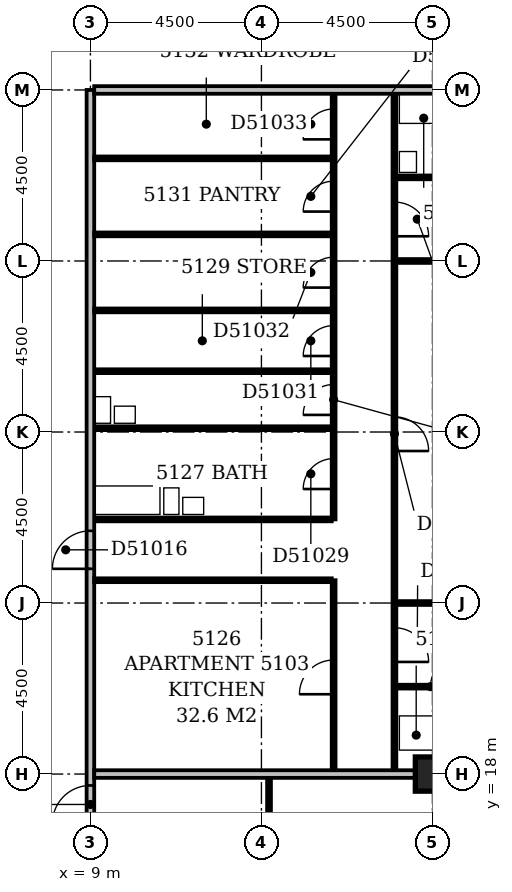
"""IFC4 building model, lengths in metres.
Left out: names, types, materials, properties, quantities, classifications, styles, units other than length and angle.
Written with IfcOpenShell. Run it as: python <this file> out.ifc"""

import sys

from ifc_helpers import new_model, si_unit, direction, frame, frame_2d, origin, origin_2d, place, context, subcontext, project, spatial, rectangle, extrude, element, fill, save


model = new_model("IFC4")
c1 = context("Model", 3, precision=1e-05, world=origin(), true_north=direction((0.0, 1.0)))
c2 = subcontext(c1, "Body", "Model", "MODEL_VIEW")
j1 = project(units=[si_unit("LENGTHUNIT", "METRE"), si_unit("PLANEANGLEUNIT", "RADIAN")], contexts=[c1])
p1 = place(None, origin())
s1 = spatial("IfcSite", under=j1, at=p1, CompositionType="ELEMENT")
p2 = place(p1, origin())
s2 = spatial("IfcBuilding", under=s1, at=p2, CompositionType="ELEMENT")
p3 = place(p2, frame((0.0, 0.0, 200.6)))
s3 = spatial("IfcBuildingStorey", under=s2, at=p3, CompositionType="ELEMENT", Elevation=200.6)
p4 = place(p3, frame((18.0, 18.0, -0.3), z_axis=(0.0, 0.0, 1.0), x_axis=(1.0, 0.0, 0.0)))
e1 = element("IfcColumn", 1, at=p4, inside=s3, PredefinedType="COLUMN", context=c2, shape_type="SweptSolid", body=[
    extrude(rectangle(XDim=0.9, YDim=0.9, at=origin_2d()), origin(), (0.0, 0.0, 1.0), 3.6),
])
p5 = place(p3, frame((9.0, 5.0, 0.0), z_axis=(0.0, 0.0, 1.0), x_axis=(0.0, 1.0, 0.0)))
e2 = element("IfcWall", 2, at=p5, inside=s3, PredefinedType="PARTITIONING", context=c2, shape_type="SweptSolid", body=[
    extrude(rectangle(XDim=31.0, YDim=0.2, at=frame_2d((15.5, 0.0))), origin(), (0.0, 0.0, 1.0), 3.3),
])
p6 = place(p5, frame((18.4, 0.0, 0.0)))
e3 = element("IfcOpeningElement", 3, at=p6, cuts=e2, PredefinedType="OPENING", context=c2, shape_type="SweptSolid", body=[
    extrude(rectangle(XDim=1.0, YDim=2.1, at=frame_2d((0.5, 1.05))), frame((0.0, 0.112, 0.0), z_axis=(0.0, -1.0, 0.0), x_axis=(1.0, 0.0, 0.0)), (0.0, 0.0, 1.0), 0.224),
])
p7 = place(p5, frame((11.7, 0.0, 0.0)))
e4 = element("IfcOpeningElement", 4, at=p7, cuts=e2, PredefinedType="OPENING", context=c2, shape_type="SweptSolid", body=[
    extrude(rectangle(XDim=1.0, YDim=2.1, at=frame_2d((0.5, 1.05))), frame((0.0, 0.112, 0.0), z_axis=(0.0, -1.0, 0.0), x_axis=(1.0, 0.0, 0.0)), (0.0, 0.0, 1.0), 0.224),
])
p8 = place(p5, frame((1.5, 0.0, 0.0)))
e5 = element("IfcOpeningElement", 5, at=p8, cuts=e2, PredefinedType="OPENING", context=c2, shape_type="SweptSolid", body=[
    extrude(rectangle(XDim=0.9, YDim=2.1, at=frame_2d((0.45, 1.05))), frame((0.0, 0.112, 0.0), z_axis=(0.0, -1.0, 0.0), x_axis=(1.0, 0.0, 0.0)), (0.0, 0.0, 1.0), 0.224),
])
p9 = place(p3, frame((13.7, 9.45, 0.0), z_axis=(0.0, 0.0, 1.0), x_axis=(0.0, 1.0, 0.0)))
e6 = element("IfcWall", 6, at=p9, inside=s3, PredefinedType="PARTITIONING", context=c2, shape_type="SweptSolid", body=[
    extrude(rectangle(XDim=8.45, YDim=0.1, at=frame_2d((4.225, 0.0))), origin(), (0.0, 0.0, 1.0), 3.3),
])
p10 = place(p9, frame((1.35, 0.0, 0.0)))
e7 = element("IfcOpeningElement", 7, at=p10, cuts=e6, PredefinedType="OPENING", context=c2, shape_type="SweptSolid", body=[
    extrude(rectangle(XDim=0.9, YDim=2.1, at=frame_2d((0.45, 1.05))), frame((0.0, 0.062, 0.0), z_axis=(0.0, -1.0, 0.0), x_axis=(1.0, 0.0, 0.0)), (0.0, 0.0, 1.0), 0.124),
])
p11 = place(p9, frame((5.85, 0.0, 0.0)))
e8 = element("IfcOpeningElement", 8, at=p11, cuts=e6, PredefinedType="OPENING", context=c2, shape_type="SweptSolid", body=[
    extrude(rectangle(XDim=0.9, YDim=2.1, at=frame_2d((0.45, 1.05))), frame((0.0, 0.062, 0.0), z_axis=(0.0, -1.0, 0.0), x_axis=(1.0, 0.0, 0.0)), (0.0, 0.0, 1.0), 0.124),
])
p12 = place(p3, frame((9.1, 18.0, 0.0), z_axis=(0.0, 0.0, 1.0), x_axis=(1.0, 0.0, 0.0)))
e9 = element("IfcWall", 9, at=p12, inside=s3, PredefinedType="PARTITIONING", context=c2, shape_type="SweptSolid", body=[
    extrude(rectangle(XDim=8.45, YDim=0.2, at=frame_2d((4.225, 0.0))), origin(), (0.0, 0.0, 1.0), 2.6),
])
p13 = place(p3, frame((15.4, 18.1, 0.0), z_axis=(0.0, 0.0, 1.0), x_axis=(0.0, 1.0, 0.0)))
e10 = element("IfcWall", 10, at=p13, inside=s3, PredefinedType="PARTITIONING", context=c2, shape_type="SweptSolid", body=[
    extrude(rectangle(XDim=5.0, YDim=0.1, at=frame_2d((2.5, 0.0))), origin(), (0.0, 0.0, 1.0), 3.3),
])
p14 = place(p13, frame((2.0, 0.0, 0.0)))
e11 = element("IfcOpeningElement", 11, at=p14, cuts=e10, PredefinedType="OPENING", context=c2, shape_type="SweptSolid", body=[
    extrude(rectangle(XDim=0.9, YDim=2.1, at=frame_2d((0.45, 1.05))), frame((0.0, 0.062, 0.0), z_axis=(0.0, -1.0, 0.0), x_axis=(1.0, 0.0, 0.0)), (0.0, 0.0, 1.0), 0.124),
])
p15 = place(p3, frame((17.0, 18.1, 0.0), z_axis=(0.0, 0.0, 1.0), x_axis=(0.0, 1.0, 0.0)))
e12 = element("IfcWall", 12, at=p15, inside=s3, PredefinedType="PARTITIONING", context=c2, shape_type="SweptSolid", body=[
    extrude(rectangle(XDim=17.8, YDim=0.1, at=frame_2d((8.9, 0.0))), origin(), (0.0, 0.0, 1.0), 3.3),
])
p16 = place(p15, frame((2.85, 0.0, 0.0)))
e13 = element("IfcOpeningElement", 13, at=p16, cuts=e12, PredefinedType="OPENING", context=c2, shape_type="SweptSolid", body=[
    extrude(rectangle(XDim=0.9, YDim=2.1, at=frame_2d((0.45, 1.05))), frame((0.0, 0.062, 0.0), z_axis=(0.0, -1.0, 0.0), x_axis=(1.0, 0.0, 0.0)), (0.0, 0.0, 1.0), 0.124),
])
p17 = place(p15, frame((8.4, 0.0, 0.0)))
e14 = element("IfcOpeningElement", 14, at=p17, cuts=e12, PredefinedType="OPENING", context=c2, shape_type="SweptSolid", body=[
    extrude(rectangle(XDim=0.9, YDim=2.1, at=frame_2d((0.45, 1.05))), frame((0.0, 0.062, 0.0), z_axis=(0.0, -1.0, 0.0), x_axis=(1.0, 0.0, 0.0)), (0.0, 0.0, 1.0), 0.124),
])
p18 = place(p15, frame((14.05, 0.0, 0.0)))
e15 = element("IfcOpeningElement", 15, at=p18, cuts=e12, PredefinedType="OPENING", context=c2, shape_type="SweptSolid", body=[
    extrude(rectangle(XDim=0.9, YDim=2.1, at=frame_2d((0.45, 1.05))), frame((0.0, 0.062, 0.0), z_axis=(0.0, -1.0, 0.0), x_axis=(1.0, 0.0, 0.0)), (0.0, 0.0, 1.0), 0.124),
])
p19 = place(p3, frame((17.05, 20.3, 0.0), z_axis=(0.0, 0.0, 1.0), x_axis=(1.0, 0.0, 0.0)))
e16 = element("IfcWall", 16, at=p19, inside=s3, PredefinedType="PLUMBINGWALL", context=c2, shape_type="SweptSolid", body=[
    extrude(rectangle(XDim=1.8, YDim=0.1, at=frame_2d((0.9, 0.0))), origin(), (0.0, 0.0, 1.0), 3.3),
])
p20 = place(p19, frame((0.9, 0.0, 0.0)))
e17 = element("IfcOpeningElement", 17, at=p20, cuts=e16, PredefinedType="OPENING", context=c2, shape_type="SweptSolid", body=[
    extrude(rectangle(XDim=0.8, YDim=2.1, at=frame_2d((0.4, 1.05))), frame((0.0, 0.062, 0.0), z_axis=(0.0, -1.0, 0.0), x_axis=(1.0, 0.0, 0.0)), (0.0, 0.0, 1.0), 0.124),
])
p21 = place(p3, frame((17.05, 22.5, 0.0), z_axis=(0.0, 0.0, 1.0), x_axis=(1.0, 0.0, 0.0)))
e18 = element("IfcWall", 18, at=p21, inside=s3, PredefinedType="PARTITIONING", context=c2, shape_type="SweptSolid", body=[
    extrude(rectangle(XDim=5.0, YDim=0.1, at=frame_2d((2.5, 0.0))), origin(), (0.0, 0.0, 1.0), 3.3),
])
p22 = place(p3, frame((9.1, 23.1, 0.0), z_axis=(0.0, 0.0, 1.0), x_axis=(1.0, 0.0, 0.0)))
e19 = element("IfcWall", 19, at=p22, inside=s3, PredefinedType="PARTITIONING", context=c2, shape_type="SweptSolid", body=[
    extrude(rectangle(XDim=6.25, YDim=0.1, at=frame_2d((3.125, 0.0))), origin(), (0.0, 0.0, 1.0), 3.3),
])
p23 = place(p3, frame((9.1, 24.7, 0.0), z_axis=(0.0, 0.0, 1.0), x_axis=(1.0, 0.0, 0.0)))
e20 = element("IfcWall", 20, at=p23, inside=s3, PredefinedType="PLUMBINGWALL", context=c2, shape_type="SweptSolid", body=[
    extrude(rectangle(XDim=6.25, YDim=0.1, at=frame_2d((3.125, 0.0))), origin(), (0.0, 0.0, 1.0), 3.3),
])
p24 = place(p3, frame((15.4, 24.7, 0.0), z_axis=(0.0, 0.0, 1.0), x_axis=(0.0, 1.0, 0.0)))
e21 = element("IfcWall", 21, at=p24, inside=s3, PredefinedType="PARTITIONING", context=c2, shape_type="SweptSolid", body=[
    extrude(rectangle(XDim=11.2, YDim=0.1, at=frame_2d((5.6, 0.0))), origin(), (0.0, 0.0, 1.0), 3.3),
])
p25 = place(p24, frame((0.8, 0.0, 0.0)))
e22 = element("IfcOpeningElement", 22, at=p25, cuts=e21, PredefinedType="OPENING", context=c2, shape_type="SweptSolid", body=[
    extrude(rectangle(XDim=0.8, YDim=2.1, at=frame_2d((0.4, 1.05))), frame((0.0, 0.062, 0.0), z_axis=(0.0, -1.0, 0.0), x_axis=(1.0, 0.0, 0.0)), (0.0, 0.0, 1.0), 0.124),
])
p26 = place(p24, frame((8.1, 0.0, 0.0)))
e23 = element("IfcOpeningElement", 23, at=p26, cuts=e21, PredefinedType="OPENING", context=c2, shape_type="SweptSolid", body=[
    extrude(rectangle(XDim=0.8, YDim=2.1, at=frame_2d((0.4, 1.05))), frame((0.0, 0.062, 0.0), z_axis=(0.0, -1.0, 0.0), x_axis=(1.0, 0.0, 0.0)), (0.0, 0.0, 1.0), 0.124),
])
p27 = place(p24, frame((4.3, 0.0, 0.0)))
e24 = element("IfcOpeningElement", 24, at=p27, cuts=e21, PredefinedType="OPENING", context=c2, shape_type="SweptSolid", body=[
    extrude(rectangle(XDim=0.8, YDim=2.1, at=frame_2d((0.4, 1.05))), frame((0.0, 0.062, 0.0), z_axis=(0.0, -1.0, 0.0), x_axis=(1.0, 0.0, 0.0)), (0.0, 0.0, 1.0), 0.124),
])
p28 = place(p24, frame((6.1, 0.0, 0.0)))
e25 = element("IfcOpeningElement", 25, at=p28, cuts=e21, PredefinedType="OPENING", context=c2, shape_type="SweptSolid", body=[
    extrude(rectangle(XDim=0.8, YDim=2.1, at=frame_2d((0.4, 1.05))), frame((0.0, 0.062, 0.0), z_axis=(0.0, -1.0, 0.0), x_axis=(1.0, 0.0, 0.0)), (0.0, 0.0, 1.0), 0.124),
])
p29 = place(p24, frame((10.0, 0.0, 0.0)))
e26 = element("IfcOpeningElement", 26, at=p29, cuts=e21, PredefinedType="OPENING", context=c2, shape_type="SweptSolid", body=[
    extrude(rectangle(XDim=0.8, YDim=2.1, at=frame_2d((0.4, 1.05))), frame((0.0, 0.062, 0.0), z_axis=(0.0, -1.0, 0.0), x_axis=(1.0, 0.0, 0.0)), (0.0, 0.0, 1.0), 0.124),
])
p30 = place(p24, frame((2.75, 0.0, 0.0)))
e27 = element("IfcOpeningElement", 27, at=p30, cuts=e21, PredefinedType="OPENING", context=c2, shape_type="SweptSolid", body=[
    extrude(rectangle(XDim=0.8, YDim=2.1, at=frame_2d((0.4, 1.05))), frame((0.0, 0.062, 0.0), z_axis=(0.0, -1.0, 0.0), x_axis=(1.0, 0.0, 0.0)), (0.0, 0.0, 1.0), 0.124),
])
p31 = place(p3, frame((9.1, 27.1, 0.0), z_axis=(0.0, 0.0, 1.0), x_axis=(1.0, 0.0, 0.0)))
e28 = element("IfcWall", 28, at=p31, inside=s3, PredefinedType="PLUMBINGWALL", context=c2, shape_type="SweptSolid", body=[
    extrude(rectangle(XDim=6.25, YDim=0.1, at=frame_2d((3.125, 0.0))), origin(), (0.0, 0.0, 1.0), 2.7),
])
p32 = place(p3, frame((9.1, 28.6, 0.0), z_axis=(0.0, 0.0, 1.0), x_axis=(1.0, 0.0, 0.0)))
e29 = element("IfcWall", 29, at=p32, inside=s3, PredefinedType="PLUMBINGWALL", context=c2, shape_type="SweptSolid", body=[
    extrude(rectangle(XDim=6.25, YDim=0.1, at=frame_2d((3.125, 0.0))), origin(), (0.0, 0.0, 1.0), 3.3),
])
p33 = place(p3, frame((9.1, 30.2, 0.0), z_axis=(0.0, 0.0, 1.0), x_axis=(1.0, 0.0, 0.0)))
e30 = element("IfcWall", 30, at=p33, inside=s3, PredefinedType="PARTITIONING", context=c2, shape_type="SweptSolid", body=[
    extrude(rectangle(XDim=6.25, YDim=0.1, at=frame_2d((3.125, 0.0))), origin(), (0.0, 0.0, 1.0), 3.3),
])
p34 = place(p3, frame((17.05, 31.5, 0.0), z_axis=(0.0, 0.0, 1.0), x_axis=(1.0, 0.0, 0.0)))
e31 = element("IfcWall", 31, at=p34, inside=s3, PredefinedType="PARTITIONING", context=c2, shape_type="SweptSolid", body=[
    extrude(rectangle(XDim=5.0, YDim=0.1, at=frame_2d((2.5, 0.0))), origin(), (0.0, 0.0, 1.0), 3.3),
])
p35 = place(p3, frame((9.1, 32.2, 0.0), z_axis=(0.0, 0.0, 1.0), x_axis=(1.0, 0.0, 0.0)))
e32 = element("IfcWall", 32, at=p35, inside=s3, PredefinedType="PARTITIONING", context=c2, shape_type="SweptSolid", body=[
    extrude(rectangle(XDim=6.25, YDim=0.1, at=frame_2d((3.125, 0.0))), origin(), (0.0, 0.0, 1.0), 3.3),
])
p36 = place(p3, frame((17.05, 33.7, 0.0), z_axis=(0.0, 0.0, 1.0), x_axis=(1.0, 0.0, 0.0)))
e33 = element("IfcWall", 33, at=p36, inside=s3, PredefinedType="PLUMBINGWALL", context=c2, shape_type="SweptSolid", body=[
    extrude(rectangle(XDim=2.8, YDim=0.1, at=frame_2d((1.4, 0.0))), origin(), (0.0, 0.0, 1.0), 3.3),
])
p37 = place(p36, frame((1.0, 0.0, 0.0)))
e34 = element("IfcOpeningElement", 34, at=p37, cuts=e33, PredefinedType="OPENING", context=c2, shape_type="SweptSolid", body=[
    extrude(rectangle(XDim=0.8, YDim=2.1, at=frame_2d((0.4, 1.05))), frame((0.0, 0.062, 0.0), z_axis=(0.0, -1.0, 0.0), x_axis=(1.0, 0.0, 0.0)), (0.0, 0.0, 1.0), 0.124),
])
p38 = place(p3, frame((9.1, 34.2, 0.0), z_axis=(0.0, 0.0, 1.0), x_axis=(1.0, 0.0, 0.0)))
e35 = element("IfcWall", 35, at=p38, inside=s3, PredefinedType="PARTITIONING", context=c2, shape_type="SweptSolid", body=[
    extrude(rectangle(XDim=6.25, YDim=0.1, at=frame_2d((3.125, 0.0))), origin(), (0.0, 0.0, 1.0), 3.3),
])
p39 = place(p3, frame((9.1, 36.0, 0.0), z_axis=(0.0, 0.0, 1.0), x_axis=(1.0, 0.0, 0.0)))
e36 = element("IfcWall", 36, at=p39, inside=s3, PredefinedType="PARTITIONING", context=c2, shape_type="SweptSolid", body=[
    extrude(rectangle(XDim=12.95, YDim=0.2, at=frame_2d((6.475, 0.0))), origin(), (0.0, 0.0, 1.0), 3.3),
])
p40 = place(p6, origin())
e37 = element("IfcDoor", 37, at=p40, inside=s3, OperationType="SINGLE_SWING_LEFT", PredefinedType="DOOR", context=c2, shape_type="SweptSolid", body=[
    extrude(rectangle(XDim=1.0, YDim=2.1, at=frame_2d((0.5, 1.05))), frame((0.0, 0.025, 0.0), z_axis=(0.0, -1.0, 0.0), x_axis=(1.0, 0.0, 0.0)), (0.0, 0.0, 1.0), 0.05),
])
fill(e3, e37)
p41 = place(p7, origin())
e38 = element("IfcDoor", 38, at=p41, inside=s3, OperationType="SINGLE_SWING_LEFT", PredefinedType="DOOR", context=c2, shape_type="SweptSolid", body=[
    extrude(rectangle(XDim=1.0, YDim=2.1, at=frame_2d((0.5, 1.05))), frame((0.0, 0.025, 0.0), z_axis=(0.0, -1.0, 0.0), x_axis=(1.0, 0.0, 0.0)), (0.0, 0.0, 1.0), 0.05),
])
fill(e4, e38)
p42 = place(p14, origin())
e39 = element("IfcDoor", 39, at=p42, inside=s3, OperationType="SINGLE_SWING_LEFT", PredefinedType="DOOR", context=c2, shape_type="SweptSolid", body=[
    extrude(rectangle(XDim=0.9, YDim=2.1, at=frame_2d((0.45, 1.05))), frame((0.0, 0.025, 0.0), z_axis=(0.0, -1.0, 0.0), x_axis=(1.0, 0.0, 0.0)), (0.0, 0.0, 1.0), 0.05),
])
fill(e11, e39)
p43 = place(p16, frame((0.9, 0.0, 0.0), z_axis=(0.0, 0.0, 1.0), x_axis=(-1.0, 0.0, 0.0)))
e40 = element("IfcDoor", 40, at=p43, inside=s3, OperationType="SINGLE_SWING_RIGHT", PredefinedType="DOOR", context=c2, shape_type="SweptSolid", body=[
    extrude(rectangle(XDim=0.9, YDim=2.1, at=frame_2d((0.45, 1.05))), frame((0.0, 0.025, 0.0), z_axis=(0.0, -1.0, 0.0), x_axis=(1.0, 0.0, 0.0)), (0.0, 0.0, 1.0), 0.05),
])
fill(e13, e40)
p44 = place(p17, frame((0.9, 0.0, 0.0), z_axis=(0.0, 0.0, 1.0), x_axis=(-1.0, 0.0, 0.0)))
e41 = element("IfcDoor", 41, at=p44, inside=s3, OperationType="SINGLE_SWING_RIGHT", PredefinedType="DOOR", context=c2, shape_type="SweptSolid", body=[
    extrude(rectangle(XDim=0.9, YDim=2.1, at=frame_2d((0.45, 1.05))), frame((0.0, 0.025, 0.0), z_axis=(0.0, -1.0, 0.0), x_axis=(1.0, 0.0, 0.0)), (0.0, 0.0, 1.0), 0.05),
])
fill(e14, e41)
p45 = place(p18, frame((0.9, 0.0, 0.0), z_axis=(0.0, 0.0, 1.0), x_axis=(-1.0, 0.0, 0.0)))
e42 = element("IfcDoor", 42, at=p45, inside=s3, OperationType="SINGLE_SWING_RIGHT", PredefinedType="DOOR", context=c2, shape_type="SweptSolid", body=[
    extrude(rectangle(XDim=0.9, YDim=2.1, at=frame_2d((0.45, 1.05))), frame((0.0, 0.025, 0.0), z_axis=(0.0, -1.0, 0.0), x_axis=(1.0, 0.0, 0.0)), (0.0, 0.0, 1.0), 0.05),
])
fill(e15, e42)
p46 = place(p20, frame((0.8, 0.0, 0.0), z_axis=(0.0, 0.0, 1.0), x_axis=(-1.0, 0.0, 0.0)))
e43 = element("IfcDoor", 43, at=p46, inside=s3, OperationType="SINGLE_SWING_LEFT", PredefinedType="DOOR", context=c2, shape_type="SweptSolid", body=[
    extrude(rectangle(XDim=0.8, YDim=2.1, at=frame_2d((0.4, 1.05))), frame((0.0, 0.025, 0.0), z_axis=(0.0, -1.0, 0.0), x_axis=(1.0, 0.0, 0.0)), (0.0, 0.0, 1.0), 0.05),
])
fill(e17, e43)
p47 = place(p25, origin())
e44 = element("IfcDoor", 44, at=p47, inside=s3, OperationType="SINGLE_SWING_LEFT", PredefinedType="DOOR", context=c2, shape_type="SweptSolid", body=[
    extrude(rectangle(XDim=0.8, YDim=2.1, at=frame_2d((0.4, 1.05))), frame((0.0, 0.025, 0.0), z_axis=(0.0, -1.0, 0.0), x_axis=(1.0, 0.0, 0.0)), (0.0, 0.0, 1.0), 0.05),
])
fill(e22, e44)
p48 = place(p26, origin())
e45 = element("IfcDoor", 45, at=p48, inside=s3, OperationType="SINGLE_SWING_LEFT", PredefinedType="DOOR", context=c2, shape_type="SweptSolid", body=[
    extrude(rectangle(XDim=0.8, YDim=2.1, at=frame_2d((0.4, 1.05))), frame((0.0, 0.025, 0.0), z_axis=(0.0, -1.0, 0.0), x_axis=(1.0, 0.0, 0.0)), (0.0, 0.0, 1.0), 0.05),
])
fill(e23, e45)
p49 = place(p27, origin())
e46 = element("IfcDoor", 46, at=p49, inside=s3, OperationType="SINGLE_SWING_LEFT", PredefinedType="DOOR", context=c2, shape_type="SweptSolid", body=[
    extrude(rectangle(XDim=0.8, YDim=2.1, at=frame_2d((0.4, 1.05))), frame((0.0, 0.025, 0.0), z_axis=(0.0, -1.0, 0.0), x_axis=(1.0, 0.0, 0.0)), (0.0, 0.0, 1.0), 0.05),
])
fill(e24, e46)
p50 = place(p28, origin())
e47 = element("IfcDoor", 47, at=p50, inside=s3, OperationType="SINGLE_SWING_LEFT", PredefinedType="DOOR", context=c2, shape_type="SweptSolid", body=[
    extrude(rectangle(XDim=0.8, YDim=2.1, at=frame_2d((0.4, 1.05))), frame((0.0, 0.025, 0.0), z_axis=(0.0, -1.0, 0.0), x_axis=(1.0, 0.0, 0.0)), (0.0, 0.0, 1.0), 0.05),
])
fill(e25, e47)
p51 = place(p29, origin())
e48 = element("IfcDoor", 48, at=p51, inside=s3, OperationType="SINGLE_SWING_LEFT", PredefinedType="DOOR", context=c2, shape_type="SweptSolid", body=[
    extrude(rectangle(XDim=0.8, YDim=2.1, at=frame_2d((0.4, 1.05))), frame((0.0, 0.025, 0.0), z_axis=(0.0, -1.0, 0.0), x_axis=(1.0, 0.0, 0.0)), (0.0, 0.0, 1.0), 0.05),
])
fill(e26, e48)
p52 = place(p30, origin())
e49 = element("IfcDoor", 49, at=p52, inside=s3, OperationType="SINGLE_SWING_LEFT", PredefinedType="DOOR", context=c2, shape_type="SweptSolid", body=[
    extrude(rectangle(XDim=0.8, YDim=2.1, at=frame_2d((0.4, 1.05))), frame((0.0, 0.025, 0.0), z_axis=(0.0, -1.0, 0.0), x_axis=(1.0, 0.0, 0.0)), (0.0, 0.0, 1.0), 0.05),
])
fill(e27, e49)
save(model, sys.argv[1])
